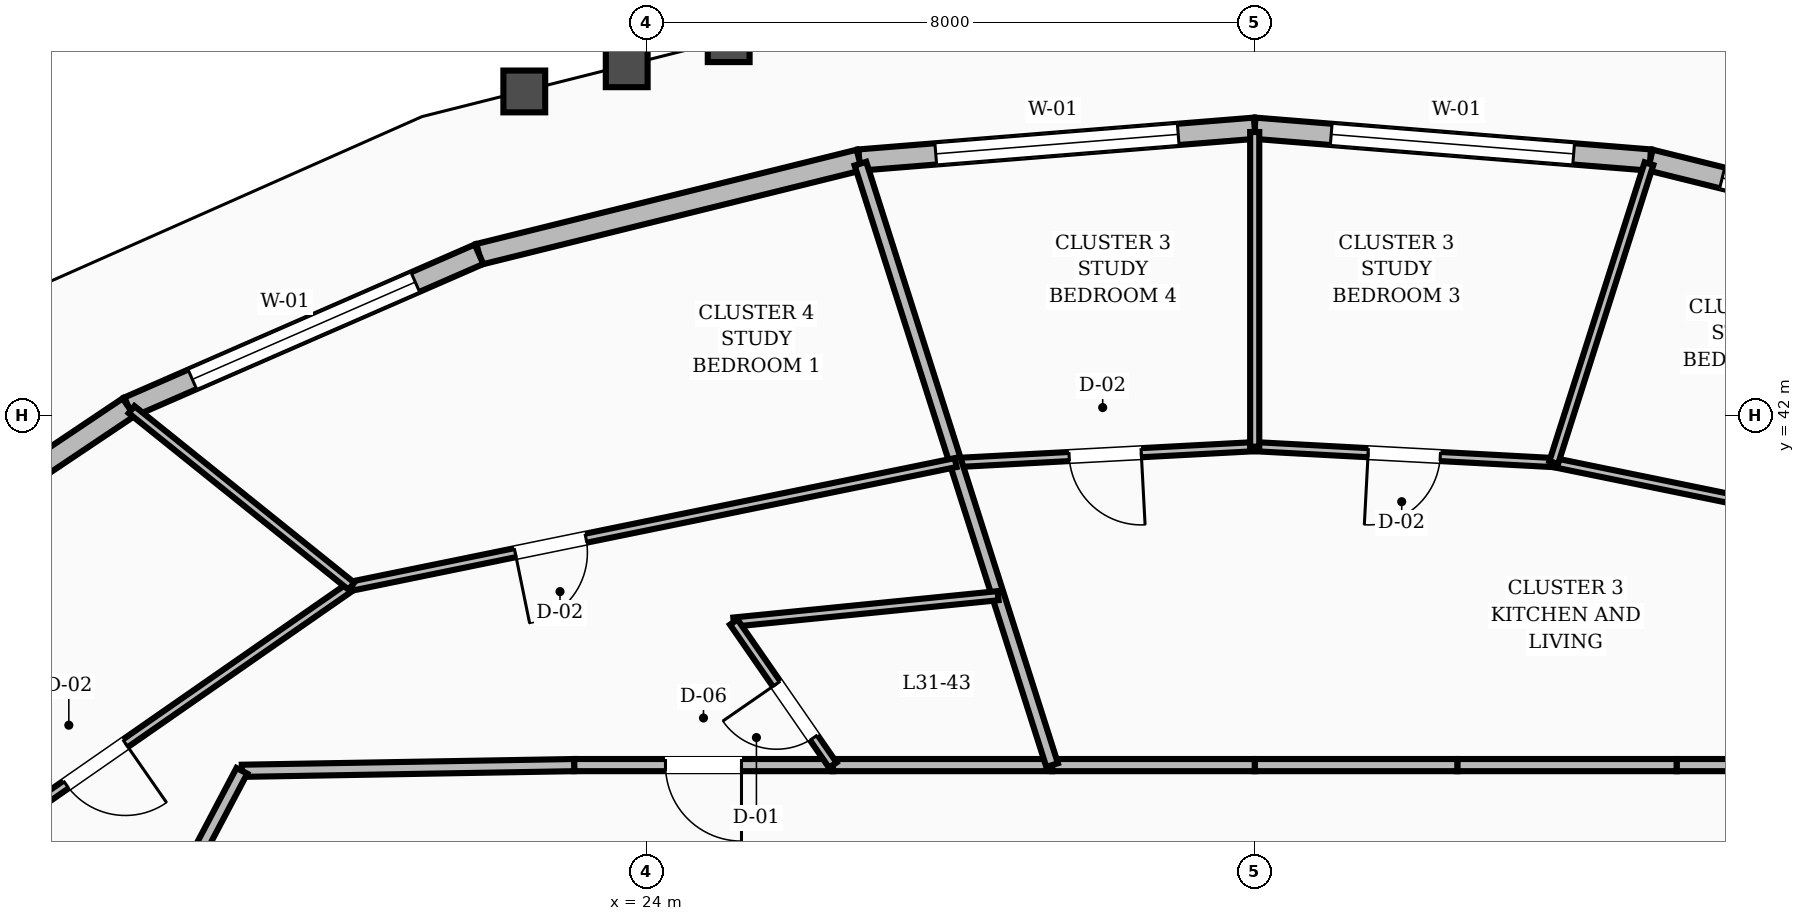
"""IFC4 building model, lengths in metres.
Left out: names, types, materials, properties, quantities, classifications, styles, units other than length and angle.
Written with IfcOpenShell. Run it as: python <this file> out.ifc"""

import sys

from ifc_helpers import new_model, si_unit, direction, frame, frame_2d, origin, place, context, subcontext, project, spatial, rectangle, extrude, element, fill, save


model = new_model("IFC4")
c1 = context("Model", 3, precision=1e-05, world=origin(), true_north=direction((0.0, 1.0)))
c2 = subcontext(c1, "Body", "Model", "MODEL_VIEW")
j1 = project(units=[si_unit("LENGTHUNIT", "METRE"), si_unit("PLANEANGLEUNIT", "RADIAN")], contexts=[c1])
p1 = place(None, origin())
s1 = spatial("IfcSite", under=j1, at=p1, CompositionType="ELEMENT")
p2 = place(p1, origin())
s2 = spatial("IfcBuilding", under=s1, at=p2, CompositionType="ELEMENT")
p3 = place(p2, frame((0.0, 0.0, 124.4)))
s3 = spatial("IfcBuildingStorey", under=s2, at=p3, CompositionType="ELEMENT", Elevation=124.4)
p4 = place(p3, frame((42.205, 44.121, 0.0), z_axis=(0.0, 0.0, 1.0), x_axis=(-0.970658593631, 0.24046183608, 0.0)))
e1 = element("IfcWall", 1, at=p4, inside=s3, PredefinedType="STANDARD", context=c2, shape_type="SweptSolid", body=[
    extrude(rectangle(XDim=5.154, YDim=0.28, at=frame_2d((2.577, 0.0))), origin(), (0.0, 0.0, 1.0), 2.82),
])
p5 = place(p4, frame((0.977, 0.0, 0.8)))
e2 = element("IfcOpeningElement", 2, at=p5, cuts=e1, PredefinedType="OPENING", context=c2, shape_type="SweptSolid", body=[
    extrude(rectangle(XDim=3.2, YDim=1.65, at=frame_2d((1.6, 0.825))), frame((0.0, 0.15, 0.0), z_axis=(0.0, -1.0, 0.0), x_axis=(1.0, 0.0, 0.0)), (0.0, 0.0, 1.0), 0.3),
])
p6 = place(p3, frame((37.202, 45.36, 0.0), z_axis=(0.0, 0.0, 1.0), x_axis=(-0.996780678479, 0.080176549013, 0.0)))
e3 = element("IfcWall", 3, at=p6, inside=s3, PredefinedType="STANDARD", context=c2, shape_type="SweptSolid", body=[
    extrude(rectangle(XDim=5.219, YDim=0.28, at=frame_2d((2.61, 0.0))), origin(), (0.0, 0.0, 1.0), 2.82),
])
p7 = place(p6, frame((1.01, 0.0, 0.8)))
e4 = element("IfcOpeningElement", 4, at=p7, cuts=e3, PredefinedType="OPENING", context=c2, shape_type="SweptSolid", body=[
    extrude(rectangle(XDim=3.2, YDim=1.65, at=frame_2d((1.6, 0.825))), frame((0.0, 0.15, 0.0), z_axis=(0.0, -1.0, 0.0), x_axis=(1.0, 0.0, 0.0)), (0.0, 0.0, 1.0), 0.3),
])
p8 = place(p3, frame((32.0, 45.779, 0.0), z_axis=(0.0, 0.0, 1.0), x_axis=(-0.996780678479, -0.080176549013, 0.0)))
e5 = element("IfcWall", 5, at=p8, inside=s3, PredefinedType="STANDARD", context=c2, shape_type="SweptSolid", body=[
    extrude(rectangle(XDim=5.219, YDim=0.28, at=frame_2d((2.61, 0.0))), origin(), (0.0, 0.0, 1.0), 2.82),
])
p9 = place(p8, frame((1.01, 0.0, 0.8)))
e6 = element("IfcOpeningElement", 6, at=p9, cuts=e5, PredefinedType="OPENING", context=c2, shape_type="SweptSolid", body=[
    extrude(rectangle(XDim=3.2, YDim=1.65, at=frame_2d((1.6, 0.825))), frame((0.0, 0.15, 0.0), z_axis=(0.0, -1.0, 0.0), x_axis=(1.0, 0.0, 0.0)), (0.0, 0.0, 1.0), 0.3),
])
p10 = place(p3, frame((26.798, 45.36, 0.0), z_axis=(0.0, 0.0, 1.0), x_axis=(-0.970658593631, -0.24046183608, 0.0)))
e7 = element("IfcWall", 7, at=p10, inside=s3, PredefinedType="STANDARD", context=c2, shape_type="SweptSolid", body=[
    extrude(rectangle(XDim=5.154, YDim=0.28, at=frame_2d((2.577, 0.0))), origin(), (0.0, 0.0, 1.0), 2.82),
])
p11 = place(p3, frame((21.795, 44.121, 0.0), z_axis=(0.0, 0.0, 1.0), x_axis=(-0.916473381058, -0.400095665825, 0.0)))
e8 = element("IfcWall", 8, at=p11, inside=s3, PredefinedType="STANDARD", context=c2, shape_type="SweptSolid", body=[
    extrude(rectangle(XDim=5.031, YDim=0.28, at=frame_2d((2.515, 0.0))), origin(), (0.0, 0.0, 1.0), 2.82),
])
p12 = place(p11, frame((0.915, 0.0, 0.8)))
e9 = element("IfcOpeningElement", 9, at=p12, cuts=e8, PredefinedType="OPENING", context=c2, shape_type="SweptSolid", body=[
    extrude(rectangle(XDim=3.2, YDim=1.65, at=frame_2d((1.6, 0.825))), frame((0.0, 0.15, 0.0), z_axis=(0.0, -1.0, 0.0), x_axis=(1.0, 0.0, 0.0)), (0.0, 0.0, 1.0), 0.3),
])
p13 = place(p3, frame((17.185, 42.108, 0.0), z_axis=(0.0, 0.0, 1.0), x_axis=(-0.83069663506, -0.556725336679, 0.0)))
e10 = element("IfcWall", 10, at=p13, inside=s3, PredefinedType="STANDARD", context=c2, shape_type="SweptSolid", body=[
    extrude(rectangle(XDim=4.865, YDim=0.28, at=frame_2d((2.432, 0.0))), origin(), (0.0, 0.0, 1.0), 2.82),
])
p14 = place(p3, frame((40.954, 37.4, 0.0), z_axis=(0.0, 0.0, 1.0), x_axis=(-1.0, 0.0, 0.0)))
e11 = element("IfcWall", 11, at=p14, inside=s3, PredefinedType="SOLIDWALL", context=c2, shape_type="SweptSolid", body=[
    extrude(rectangle(XDim=3.403, YDim=0.16, at=frame_2d((1.702, 0.0))), origin(), (0.0, 0.0, 1.0), 2.8),
])
p15 = place(p3, frame((37.551, 37.4, 0.0), z_axis=(0.0, 0.0, 1.0), x_axis=(-1.0, 0.0, 0.0)))
e12 = element("IfcWall", 12, at=p15, inside=s3, PredefinedType="SOLIDWALL", context=c2, shape_type="SweptSolid", body=[
    extrude(rectangle(XDim=2.885, YDim=0.16, at=frame_2d((1.443, 0.0))), origin(), (0.0, 0.0, 1.0), 2.8),
])
for number, where, z_axis, x_axis in (
    (13, (34.665, 37.4, 0.0), (0.0, 0.0, 1.0), (-1.0, 0.0, 0.0)),
    (14, (32.0, 37.4, 0.0), (0.0, 0.0, 1.0), (-1.0, 0.0, 0.0)),
):
    element("IfcWall", number, at=place(p3, frame(where, z_axis=z_axis, x_axis=x_axis)), inside=s3, PredefinedType="SOLIDWALL", context=c2, shape_type="SweptSolid", body=[
        extrude(rectangle(XDim=2.665, YDim=0.16, at=frame_2d((1.333, 0.0))), origin(), (0.0, 0.0, 1.0), 2.8),
    ])
p16 = place(p3, frame((29.335, 37.4, 0.0), z_axis=(0.0, 0.0, 1.0), x_axis=(-1.0, 0.0, 0.0)))
e15 = element("IfcWall", 15, at=p16, inside=s3, PredefinedType="SOLIDWALL", context=c2, shape_type="SweptSolid", body=[
    extrude(rectangle(XDim=2.885, YDim=0.16, at=frame_2d((1.443, 0.0))), origin(), (0.0, 0.0, 1.0), 2.8),
])
p17 = place(p3, frame((26.449, 37.4, 0.0), z_axis=(0.0, 0.0, 1.0), x_axis=(-1.0, 0.0, 0.0)))
e16 = element("IfcWall", 16, at=p17, inside=s3, PredefinedType="SOLIDWALL", context=c2, shape_type="SweptSolid", body=[
    extrude(rectangle(XDim=3.403, YDim=0.16, at=frame_2d((1.702, 0.0))), origin(), (0.0, 0.0, 1.0), 2.8),
])
p18 = place(p17, frame((1.201, 0.0, 0.0)))
e17 = element("IfcOpeningElement", 17, at=p18, cuts=e16, PredefinedType="OPENING", context=c2, shape_type="SweptSolid", body=[
    extrude(rectangle(XDim=1.0, YDim=2.1, at=frame_2d((0.5, 1.05))), frame((0.0, 0.09, 0.0), z_axis=(0.0, -1.0, 0.0), x_axis=(1.0, 0.0, 0.0)), (0.0, 0.0, 1.0), 0.18),
])
p19 = place(p3, frame((23.046, 37.4, 0.0), z_axis=(0.0, 0.0, 1.0), x_axis=(-0.999853038912, -0.017143528788, 0.0)))
e18 = element("IfcWall", 18, at=p19, inside=s3, PredefinedType="SOLIDWALL", context=c2, shape_type="SweptSolid", body=[
    extrude(rectangle(XDim=4.372, YDim=0.16, at=frame_2d((2.186, 0.0))), origin(), (0.0, 0.0, 1.0), 2.8),
])
p20 = place(p3, frame((18.675, 37.325, 0.0), z_axis=(0.0, 0.0, 1.0), x_axis=(-0.466737093093, -0.884396113702, 0.0)))
e19 = element("IfcWall", 19, at=p20, inside=s3, PredefinedType="SOLIDWALL", context=c2, shape_type="SweptSolid", body=[
    extrude(rectangle(XDim=3.696, YDim=0.16, at=frame_2d((1.848, 0.0))), origin(), (0.0, 0.0, 1.0), 2.8),
])
p21 = place(p3, frame((43.885, 39.754, 0.0), z_axis=(0.0, 0.0, 1.0), x_axis=(-0.979728085565, 0.200331920462, 0.0)))
e20 = element("IfcWall", 20, at=p21, inside=s3, PredefinedType="PARTITIONING", context=c2, shape_type="SweptSolid", body=[
    extrude(rectangle(XDim=8.115, YDim=0.12, at=frame_2d((4.058, 0.0))), origin(), (0.0, 0.0, 1.0), 2.8),
])
p22 = place(p21, frame((3.583, 0.0, 0.0)))
e21 = element("IfcOpeningElement", 21, at=p22, cuts=e20, PredefinedType="OPENING", context=c2, shape_type="SweptSolid", body=[
    extrude(rectangle(XDim=0.95, YDim=2.1, at=frame_2d((0.475, 1.05))), frame((0.0, 0.07, 0.0), z_axis=(0.0, -1.0, 0.0), x_axis=(1.0, 0.0, 0.0)), (0.0, 0.0, 1.0), 0.14),
])
p23 = place(p3, frame((35.934, 41.38, 0.0), z_axis=(0.0, 0.0, 1.0), x_axis=(-0.998585283564, 0.0531735973, 0.0)))
e22 = element("IfcWall", 22, at=p23, inside=s3, PredefinedType="PARTITIONING", context=c2, shape_type="SweptSolid", body=[
    extrude(rectangle(XDim=3.939, YDim=0.12, at=frame_2d((1.97, 0.0))), origin(), (0.0, 0.0, 1.0), 2.8),
])
p24 = place(p23, frame((1.495, 0.0, 0.0)))
e23 = element("IfcOpeningElement", 23, at=p24, cuts=e22, PredefinedType="OPENING", context=c2, shape_type="SweptSolid", body=[
    extrude(rectangle(XDim=0.95, YDim=2.1, at=frame_2d((0.475, 1.05))), frame((0.0, 0.07, 0.0), z_axis=(0.0, -1.0, 0.0), x_axis=(1.0, 0.0, 0.0)), (0.0, 0.0, 1.0), 0.14),
])
p25 = place(p3, frame((35.934, 41.38, 0.0), z_axis=(0.0, 0.0, 1.0), x_axis=(0.30367237582, 0.95277651533, 0.0)))
e24 = element("IfcWall", 24, at=p25, inside=s3, PredefinedType="PARTITIONING", context=c2, shape_type="SweptSolid", body=[
    extrude(rectangle(XDim=4.127, YDim=0.12, at=frame_2d((2.064, 0.0))), origin(), (0.0, 0.0, 1.0), 2.8),
])
p26 = place(p3, frame((32.0, 41.589, 0.0), z_axis=(0.0, 0.0, 1.0), x_axis=(-0.998585283564, -0.0531735973, 0.0)))
e25 = element("IfcWall", 25, at=p26, inside=s3, PredefinedType="PARTITIONING", context=c2, shape_type="SweptSolid", body=[
    extrude(rectangle(XDim=3.939, YDim=0.12, at=frame_2d((1.97, 0.0))), origin(), (0.0, 0.0, 1.0), 2.8),
])
p27 = place(p26, frame((1.495, 0.0, 0.0)))
e26 = element("IfcOpeningElement", 26, at=p27, cuts=e25, PredefinedType="OPENING", context=c2, shape_type="SweptSolid", body=[
    extrude(rectangle(XDim=0.95, YDim=2.1, at=frame_2d((0.475, 1.05))), frame((0.0, 0.07, 0.0), z_axis=(0.0, -1.0, 0.0), x_axis=(1.0, 0.0, 0.0)), (0.0, 0.0, 1.0), 0.14),
])
p28 = place(p3, frame((32.0, 41.589, 0.0), z_axis=(0.0, 0.0, 1.0), x_axis=(0.0, 1.0, 0.0)))
e27 = element("IfcWall", 27, at=p28, inside=s3, PredefinedType="PARTITIONING", context=c2, shape_type="SweptSolid", body=[
    extrude(rectangle(XDim=4.139, YDim=0.12, at=frame_2d((2.07, 0.0))), origin(), (0.0, 0.0, 1.0), 2.8),
])
p29 = place(p3, frame((29.335, 37.4, 0.0), z_axis=(0.0, 0.0, 1.0), x_axis=(-0.303676848988, 0.952775089614, 0.0)))
e28 = element("IfcWall", 28, at=p29, inside=s3, PredefinedType="SOLIDWALL", context=c2, shape_type="SweptSolid", body=[
    extrude(rectangle(XDim=8.305, YDim=0.16, at=frame_2d((4.152, 0.0))), origin(), (0.0, 0.0, 1.0), 2.8),
])
p30 = place(p3, frame((28.624, 39.629, 0.0), z_axis=(0.0, 0.0, 1.0), x_axis=(-0.995055154647, -0.099323910565, 0.0)))
e29 = element("IfcWall", 29, at=p30, inside=s3, PredefinedType="PARTITIONING", context=c2, shape_type="SweptSolid", body=[
    extrude(rectangle(XDim=3.495, YDim=0.12, at=frame_2d((1.748, 0.0))), origin(), (0.0, 0.0, 1.0), 2.8),
])
p31 = place(p3, frame((26.449, 37.4, 0.0), z_axis=(0.0, 0.0, 1.0), x_axis=(-0.569331987511, 0.822107710703, 0.0)))
e30 = element("IfcWall", 30, at=p31, inside=s3, PredefinedType="PARTITIONING", context=c2, shape_type="SweptSolid", body=[
    extrude(rectangle(XDim=2.289, YDim=0.12, at=frame_2d((1.145, 0.0))), origin(), (0.0, 0.0, 1.0), 2.8),
])
p32 = place(p31, frame((0.44, 0.0, 0.0)))
e31 = element("IfcOpeningElement", 31, at=p32, cuts=e30, PredefinedType="OPENING", context=c2, shape_type="SweptSolid", body=[
    extrude(rectangle(XDim=0.86, YDim=2.1, at=frame_2d((0.43, 1.05))), frame((0.0, 0.07, 0.0), z_axis=(0.0, -1.0, 0.0), x_axis=(1.0, 0.0, 0.0)), (0.0, 0.0, 1.0), 0.14),
])
p33 = place(p3, frame((28.066, 41.38, 0.0), z_axis=(0.0, 0.0, 1.0), x_axis=(-0.979728085565, -0.200331920462, 0.0)))
e32 = element("IfcWall", 32, at=p33, inside=s3, PredefinedType="PARTITIONING", context=c2, shape_type="SweptSolid", body=[
    extrude(rectangle(XDim=8.115, YDim=0.12, at=frame_2d((4.058, 0.0))), origin(), (0.0, 0.0, 1.0), 2.8),
])
p34 = place(p33, frame((4.965, 0.0, 0.0)))
e33 = element("IfcOpeningElement", 33, at=p34, cuts=e32, PredefinedType="OPENING", context=c2, shape_type="SweptSolid", body=[
    extrude(rectangle(XDim=0.95, YDim=2.1, at=frame_2d((0.475, 1.05))), frame((0.0, 0.07, 0.0), z_axis=(0.0, -1.0, 0.0), x_axis=(1.0, 0.0, 0.0)), (0.0, 0.0, 1.0), 0.14),
])
p35 = place(p3, frame((20.115, 39.754, 0.0), z_axis=(0.0, 0.0, 1.0), x_axis=(-0.821091021829, -0.570797279139, 0.0)))
e34 = element("IfcWall", 34, at=p35, inside=s3, PredefinedType="PARTITIONING", context=c2, shape_type="SweptSolid", body=[
    extrude(rectangle(XDim=8.193, YDim=0.12, at=frame_2d((4.096, 0.0))), origin(), (0.0, 0.0, 1.0), 2.8),
])
p36 = place(p35, frame((3.621, 0.0, 0.0)))
e35 = element("IfcOpeningElement", 35, at=p36, cuts=e34, PredefinedType="OPENING", context=c2, shape_type="SweptSolid", body=[
    extrude(rectangle(XDim=0.95, YDim=2.1, at=frame_2d((0.475, 1.05))), frame((0.0, 0.07, 0.0), z_axis=(0.0, -1.0, 0.0), x_axis=(1.0, 0.0, 0.0)), (0.0, 0.0, 1.0), 0.14),
])
p37 = place(p3, frame((20.115, 39.754, 0.0), z_axis=(0.0, 0.0, 1.0), x_axis=(-0.779621413821, 0.626251108671, 0.0)))
e36 = element("IfcWall", 36, at=p37, inside=s3, PredefinedType="PARTITIONING", context=c2, shape_type="SweptSolid", body=[
    extrude(rectangle(XDim=3.709, YDim=0.12, at=frame_2d((1.854, 0.0))), origin(), (0.0, 0.0, 1.0), 2.8),
])
p38 = place(p5, origin())
e37 = element("IfcWindow", 37, at=p38, inside=s3, PartitioningType="SINGLE_PANEL", PredefinedType="WINDOW", context=c2, shape_type="SweptSolid", body=[
    extrude(rectangle(XDim=3.2, YDim=1.65, at=frame_2d((1.6, 0.825))), frame((0.0, 0.03, 0.0), z_axis=(0.0, -1.0, 0.0), x_axis=(1.0, 0.0, 0.0)), (0.0, 0.0, 1.0), 0.06),
])
fill(e2, e37)
p39 = place(p7, origin())
e38 = element("IfcWindow", 38, at=p39, inside=s3, PartitioningType="SINGLE_PANEL", PredefinedType="WINDOW", context=c2, shape_type="SweptSolid", body=[
    extrude(rectangle(XDim=3.2, YDim=1.65, at=frame_2d((1.6, 0.825))), frame((0.0, 0.03, 0.0), z_axis=(0.0, -1.0, 0.0), x_axis=(1.0, 0.0, 0.0)), (0.0, 0.0, 1.0), 0.06),
])
fill(e4, e38)
p40 = place(p9, origin())
e39 = element("IfcWindow", 39, at=p40, inside=s3, PartitioningType="SINGLE_PANEL", PredefinedType="WINDOW", context=c2, shape_type="SweptSolid", body=[
    extrude(rectangle(XDim=3.2, YDim=1.65, at=frame_2d((1.6, 0.825))), frame((0.0, 0.03, 0.0), z_axis=(0.0, -1.0, 0.0), x_axis=(1.0, 0.0, 0.0)), (0.0, 0.0, 1.0), 0.06),
])
fill(e6, e39)
p41 = place(p12, origin())
e40 = element("IfcWindow", 40, at=p41, inside=s3, PartitioningType="SINGLE_PANEL", PredefinedType="WINDOW", context=c2, shape_type="SweptSolid", body=[
    extrude(rectangle(XDim=3.2, YDim=1.65, at=frame_2d((1.6, 0.825))), frame((0.0, 0.03, 0.0), z_axis=(0.0, -1.0, 0.0), x_axis=(1.0, 0.0, 0.0)), (0.0, 0.0, 1.0), 0.06),
])
fill(e9, e40)
p42 = place(p24, origin())
e41 = element("IfcDoor", 41, at=p42, inside=s3, OperationType="SINGLE_SWING_RIGHT", PredefinedType="DOOR", context=c2, shape_type="SweptSolid", body=[
    extrude(rectangle(XDim=0.95, YDim=2.1, at=frame_2d((0.475, 1.05))), frame((0.0, 0.025, 0.0), z_axis=(0.0, -1.0, 0.0), x_axis=(1.0, 0.0, 0.0)), (0.0, 0.0, 1.0), 0.05),
])
fill(e23, e41)
p43 = place(p27, origin())
e42 = element("IfcDoor", 42, at=p43, inside=s3, OperationType="SINGLE_SWING_LEFT", PredefinedType="DOOR", context=c2, shape_type="SweptSolid", body=[
    extrude(rectangle(XDim=0.95, YDim=2.1, at=frame_2d((0.475, 1.05))), frame((0.0, 0.025, 0.0), z_axis=(0.0, -1.0, 0.0), x_axis=(1.0, 0.0, 0.0)), (0.0, 0.0, 1.0), 0.05),
])
fill(e26, e42)
p44 = place(p32, origin())
e43 = element("IfcDoor", 43, at=p44, inside=s3, OperationType="SINGLE_SWING_RIGHT", PredefinedType="DOOR", context=c2, shape_type="SweptSolid", body=[
    extrude(rectangle(XDim=0.86, YDim=2.1, at=frame_2d((0.43, 1.05))), frame((0.0, 0.025, 0.0), z_axis=(0.0, -1.0, 0.0), x_axis=(1.0, 0.0, 0.0)), (0.0, 0.0, 1.0), 0.05),
])
fill(e31, e43)
p45 = place(p18, origin())
e44 = element("IfcDoor", 44, at=p45, inside=s3, OperationType="SINGLE_SWING_LEFT", PredefinedType="DOOR", context=c2, shape_type="SweptSolid", body=[
    extrude(rectangle(XDim=1.0, YDim=2.1, at=frame_2d((0.5, 1.05))), frame((0.0, 0.025, 0.0), z_axis=(0.0, -1.0, 0.0), x_axis=(1.0, 0.0, 0.0)), (0.0, 0.0, 1.0), 0.05),
])
fill(e17, e44)
p46 = place(p34, origin())
e45 = element("IfcDoor", 45, at=p46, inside=s3, OperationType="SINGLE_SWING_RIGHT", PredefinedType="DOOR", context=c2, shape_type="SweptSolid", body=[
    extrude(rectangle(XDim=0.95, YDim=2.1, at=frame_2d((0.475, 1.05))), frame((0.0, 0.025, 0.0), z_axis=(0.0, -1.0, 0.0), x_axis=(1.0, 0.0, 0.0)), (0.0, 0.0, 1.0), 0.05),
])
fill(e33, e45)
p47 = place(p36, origin())
e46 = element("IfcDoor", 46, at=p47, inside=s3, OperationType="SINGLE_SWING_LEFT", PredefinedType="DOOR", context=c2, shape_type="SweptSolid", body=[
    extrude(rectangle(XDim=0.95, YDim=2.1, at=frame_2d((0.475, 1.05))), frame((0.0, 0.025, 0.0), z_axis=(0.0, -1.0, 0.0), x_axis=(1.0, 0.0, 0.0)), (0.0, 0.0, 1.0), 0.05),
])
fill(e35, e46)
save(model, sys.argv[1])
